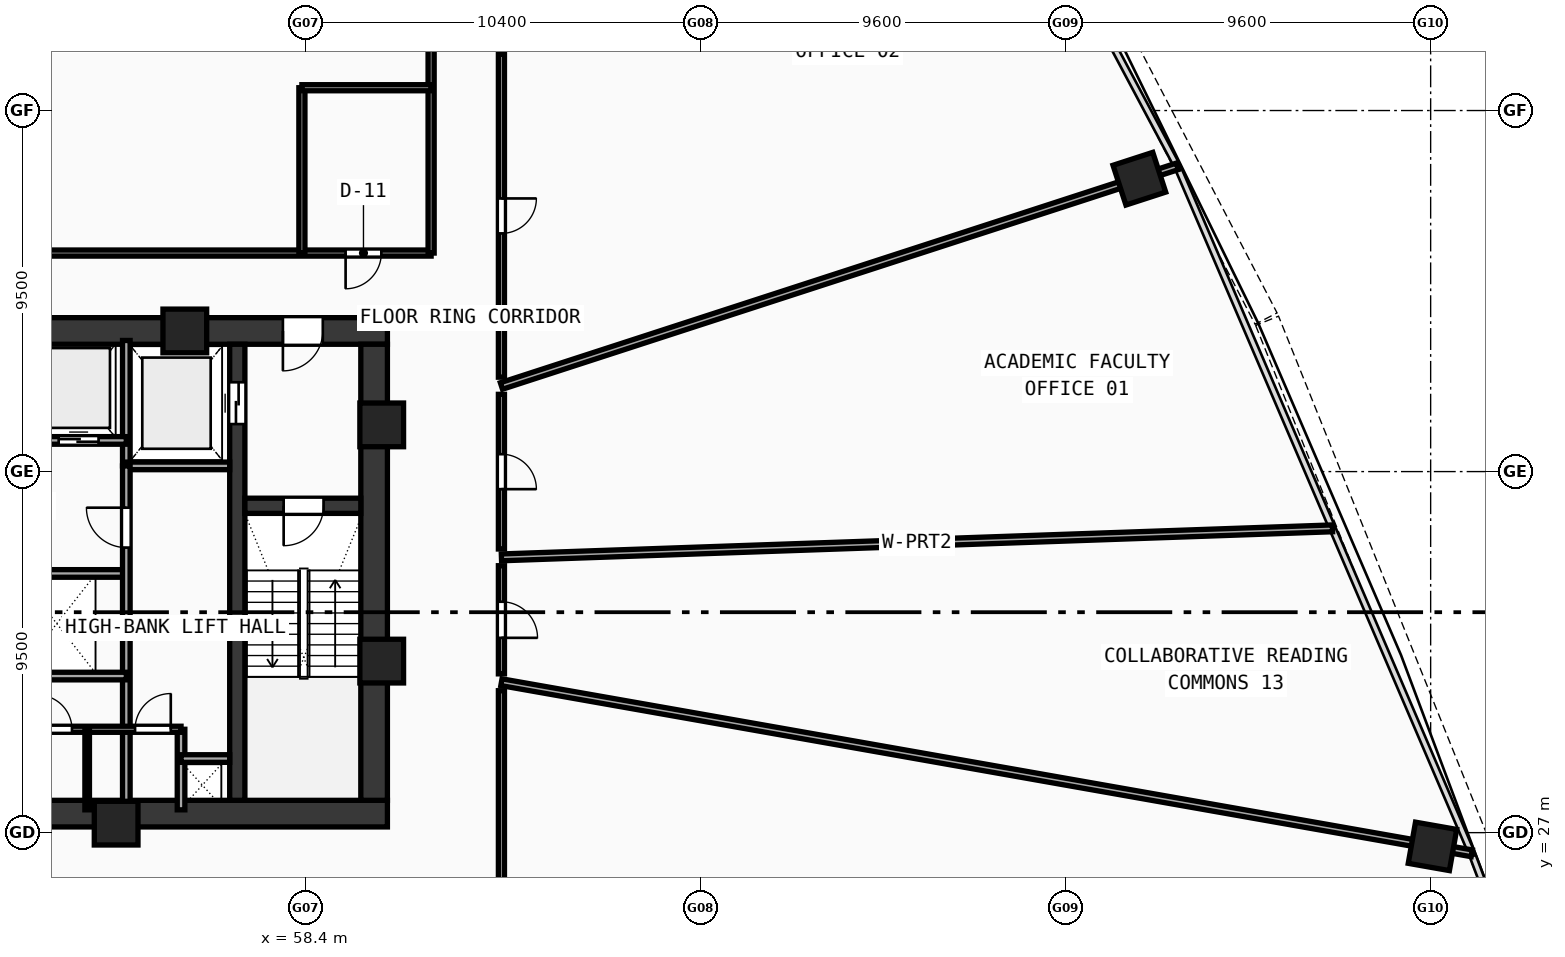
"""IFC4 building model, lengths in metres.
Left out: names, types, materials, properties, quantities, classifications, styles, units other than length and angle.
Written with IfcOpenShell. Run it as: python <this file> out.ifc"""

import sys

from ifc_helpers import new_model, si_unit, direction, frame, frame_2d, origin, origin_with_axes, origin_2d, place, context, subcontext, project, spatial, rectangle, hollow_rectangle, extrude, source, transform, mapped, element, fill, save


model = new_model("IFC4")
c1 = context("Model", 3, precision=1e-05, world=origin(), true_north=direction((0.0, 1.0)))
c2 = subcontext(c1, "Body", "Model", "MODEL_VIEW")
j1 = project(units=[si_unit("LENGTHUNIT", "METRE"), si_unit("PLANEANGLEUNIT", "RADIAN")], contexts=[c1])
p1 = place(None, origin())
s1 = spatial("IfcSite", under=j1, at=p1, CompositionType="ELEMENT")
p2 = place(p1, origin())
s2 = spatial("IfcBuilding", under=s1, at=p2, CompositionType="ELEMENT")
p3 = place(p2, frame((0.0, 0.0, 63.07)))
s3 = spatial("IfcBuildingStorey", under=s2, at=p3, CompositionType="ELEMENT", Elevation=63.07)
p4 = place(p3, frame((35.45, 27.5, 0.0), z_axis=(0.0, 0.0, 1.0), x_axis=(1.0, 0.0, 0.0)))
e1 = element("IfcWall", 1, at=p4, inside=s3, PredefinedType="SHEAR", context=c2, shape_type="SweptSolid", body=[
    extrude(rectangle(XDim=25.1, YDim=0.7, at=frame_2d((12.55, 0.0))), origin(), (0.0, 0.0, 1.0), 3.37),
])
p5 = place(p3, frame((49.2, 40.2, 0.0), z_axis=(0.0, 0.0, 1.0), x_axis=(1.0, 0.0, 0.0)))
e2 = element("IfcWall", 2, at=p5, inside=s3, PredefinedType="SHEAR", context=c2, shape_type="SweptSolid", body=[
    extrude(rectangle(XDim=11.35, YDim=0.7, at=frame_2d((5.675, 0.0))), origin(), (0.0, 0.0, 1.0), 3.37),
])
p6 = place(p5, frame((8.6, 0.0, 0.0)))
e3 = element("IfcOpeningElement", 3, at=p6, cuts=e2, PredefinedType="OPENING", context=c2, shape_type="SweptSolid", body=[
    extrude(rectangle(XDim=1.05, YDim=2.1, at=frame_2d((0.525, 1.05))), frame((0.0, 0.36, 0.0), z_axis=(0.0, -1.0, 0.0), x_axis=(1.0, 0.0, 0.0)), (0.0, 0.0, 1.0), 0.72),
])
p7 = place(p3, frame((60.2, 27.85, 0.0), z_axis=(0.0, 0.0, 1.0), x_axis=(0.0, 1.0, 0.0)))
e4 = element("IfcWall", 4, at=p7, inside=s3, PredefinedType="SHEAR", context=c2, shape_type="SweptSolid", body=[
    extrude(rectangle(XDim=12.0, YDim=0.7, at=frame_2d((6.0, 0.0))), origin(), (0.0, 0.0, 1.0), 3.37),
])
p8 = place(p3, frame((56.6, 27.85, 0.0), z_axis=(0.0, 0.0, 1.0), x_axis=(0.0, 1.0, 0.0)))
e5 = element("IfcWall", 5, at=p8, inside=s3, PredefinedType="SHEAR", context=c2, shape_type="SweptSolid", body=[
    extrude(rectangle(XDim=12.0, YDim=0.4, at=frame_2d((6.0, 0.0))), origin(), (0.0, 0.0, 1.0), 3.37),
])
p9 = place(p8, frame((9.9, 0.0, 0.0)))
e6 = element("IfcOpeningElement", 6, at=p9, cuts=e5, PredefinedType="OPENING", context=c2, shape_type="SweptSolid", body=[
    extrude(rectangle(XDim=1.1, YDim=2.1, at=frame_2d((0.55, 1.05))), frame((0.0, 0.21, 0.0), z_axis=(0.0, -1.0, 0.0), x_axis=(1.0, 0.0, 0.0)), (0.0, 0.0, 1.0), 0.42),
])
p10 = place(p3, frame((56.8, 35.6, 0.0), z_axis=(0.0, 0.0, 1.0), x_axis=(1.0, 0.0, 0.0)))
e7 = element("IfcWall", 7, at=p10, inside=s3, PredefinedType="SHEAR", context=c2, shape_type="SweptSolid", body=[
    extrude(rectangle(XDim=3.05, YDim=0.4, at=frame_2d((1.525, 0.0))), origin(), (0.0, 0.0, 1.0), 3.37),
])
p11 = place(p10, frame((1.02, 0.0, 0.0)))
e8 = element("IfcOpeningElement", 8, at=p11, cuts=e7, PredefinedType="OPENING", context=c2, shape_type="SweptSolid", body=[
    extrude(rectangle(XDim=1.05, YDim=2.1, at=frame_2d((0.525, 1.05))), frame((0.0, 0.21, 0.0), z_axis=(0.0, -1.0, 0.0), x_axis=(1.0, 0.0, 0.0)), (0.0, 0.0, 1.0), 0.42),
])
m1 = source(origin(), c2, "Body", "SweptSolid", [
    extrude(hollow_rectangle(XDim=1.15, YDim=1.15, WallThickness=0.048, at=origin_2d()), origin(), (0.0, 0.0, 1.0), 3.63),
])
for number, where, z_axis, x_axis in (
    (9, (53.412, 27.25, -0.26), (0.0, 0.0, 1.0), (1.0, 0.0, 0.0)),
    (10, (60.4, 31.513, -0.26), (0.0, 0.0, 1.0), (1.0, 0.0, 0.0)),
    (11, (60.4, 37.729, -0.26), (0.0, 0.0, 1.0), (1.0, 0.0, 0.0)),
    (12, (55.219, 40.2, -0.26), (0.0, 0.0, 1.0), (1.0, 0.0, 0.0)),
):
    element("IfcColumn", number, at=place(p3, frame(where, z_axis=z_axis, x_axis=x_axis)), inside=s3, PredefinedType="COLUMN", context=c2, shape_type="MappedRepresentation", body=[
        mapped(m1, transform((0.0, 0.0, 0.0), scale=1.0)),
    ])
m2 = source(origin(), c2, "Body", "SweptSolid", [
    extrude(hollow_rectangle(XDim=1.1, YDim=1.1, WallThickness=0.045, at=origin_2d()), origin(), (0.0, 0.0, 1.0), 3.63),
])
for number, where, z_axis, x_axis in (
    (13, (88.048, 26.638, -0.26), (0.0, 0.0, 1.0), (0.174, 0.985, 0.0)),
    (14, (80.335, 44.206, -0.26), (0.0, 0.0, 1.0), (-0.309, 0.951, 0.0)),
):
    element("IfcColumn", number, at=place(p3, frame(where, z_axis=z_axis, x_axis=x_axis)), inside=s3, PredefinedType="COLUMN", context=c2, shape_type="MappedRepresentation", body=[
        mapped(m2, transform((0.0, 0.0, 0.0), scale=1.0)),
    ])
p12 = place(p3, frame((53.68, 36.65, 0.0), z_axis=(0.0, 0.0, 1.0), x_axis=(0.0, 1.0, 0.0)))
e15 = element("IfcWall", 15, at=p12, inside=s3, PredefinedType="SOLIDWALL", context=c2, shape_type="SweptSolid", body=[
    extrude(rectangle(XDim=3.3, YDim=0.2, at=frame_2d((1.65, 0.0))), origin(), (0.0, 0.0, 1.0), 3.37),
])
p13 = place(p3, frame((53.68, 36.65, 0.0), z_axis=(0.0, 0.0, 1.0), x_axis=(1.0, 0.0, 0.0)))
e16 = element("IfcWall", 16, at=p13, inside=s3, PredefinedType="SOLIDWALL", context=c2, shape_type="SweptSolid", body=[
    extrude(rectangle(XDim=2.72, YDim=0.2, at=frame_2d((1.36, 0.0))), origin(), (0.0, 0.0, 1.0), 3.37),
])
p14 = place(p3, frame((48.95, 37.32, 0.0), z_axis=(0.0, 0.0, 1.0), x_axis=(1.0, 0.0, 0.0)))
e17 = element("IfcWall", 17, at=p14, inside=s3, PredefinedType="SOLIDWALL", context=c2, shape_type="SweptSolid", body=[
    extrude(rectangle(XDim=4.73, YDim=0.2, at=frame_2d((2.365, 0.0))), origin(), (0.0, 0.0, 1.0), 3.37),
])
p15 = place(p14, frame((0.65, 0.0, 0.0)))
e18 = element("IfcOpeningElement", 18, at=p15, cuts=e17, PredefinedType="OPENING", context=c2, shape_type="SweptSolid", body=[
    extrude(rectangle(XDim=1.05, YDim=2.1, at=frame_2d((0.525, 1.05))), frame((0.0, 0.11, 0.0), z_axis=(0.0, -1.0, 0.0), x_axis=(1.0, 0.0, 0.0)), (0.0, 0.0, 1.0), 0.22),
])
p16 = place(p14, frame((2.95, 0.0, 0.0)))
e19 = element("IfcOpeningElement", 19, at=p16, cuts=e17, PredefinedType="OPENING", context=c2, shape_type="SweptSolid", body=[
    extrude(rectangle(XDim=1.05, YDim=2.1, at=frame_2d((0.525, 1.05))), frame((0.0, 0.11, 0.0), z_axis=(0.0, -1.0, 0.0), x_axis=(1.0, 0.0, 0.0)), (0.0, 0.0, 1.0), 0.22),
])
p17 = place(p3, frame((43.85, 33.82, 0.0), z_axis=(0.0, 0.0, 1.0), x_axis=(1.0, 0.0, 0.0)))
e20 = element("IfcWall", 20, at=p17, inside=s3, PredefinedType="SOLIDWALL", context=c2, shape_type="SweptSolid", body=[
    extrude(rectangle(XDim=9.83, YDim=0.2, at=frame_2d((4.915, 0.0))), origin(), (0.0, 0.0, 1.0), 3.37),
])
p18 = place(p3, frame((53.68, 27.6, 0.0), z_axis=(0.0, 0.0, 1.0), x_axis=(0.0, 1.0, 0.0)))
e21 = element("IfcWall", 21, at=p18, inside=s3, PredefinedType="SOLIDWALL", context=c2, shape_type="SweptSolid", body=[
    extrude(rectangle(XDim=9.05, YDim=0.2, at=frame_2d((4.525, 0.0))), origin(), (0.0, 0.0, 1.0), 3.37),
])
p19 = place(p18, frame((6.9, 0.0, 0.0)))
e22 = element("IfcOpeningElement", 22, at=p19, cuts=e21, PredefinedType="OPENING", context=c2, shape_type="SweptSolid", body=[
    extrude(rectangle(XDim=1.05, YDim=2.1, at=frame_2d((0.525, 1.05))), frame((0.0, 0.11, 0.0), z_axis=(0.0, -1.0, 0.0), x_axis=(1.0, 0.0, 0.0)), (0.0, 0.0, 1.0), 0.22),
])
p20 = place(p3, frame((43.85, 31.12, 0.0), z_axis=(0.0, 0.0, 1.0), x_axis=(1.0, 0.0, 0.0)))
e23 = element("IfcWall", 23, at=p20, inside=s3, PredefinedType="SOLIDWALL", context=c2, shape_type="SweptSolid", body=[
    extrude(rectangle(XDim=9.83, YDim=0.2, at=frame_2d((4.915, 0.0))), origin(), (0.0, 0.0, 1.0), 3.37),
])
p21 = place(p3, frame((55.12, 27.6, 0.0), z_axis=(0.0, 0.0, 1.0), x_axis=(0.0, 1.0, 0.0)))
e24 = element("IfcWall", 24, at=p21, inside=s3, PredefinedType="SOLIDWALL", context=c2, shape_type="SweptSolid", body=[
    extrude(rectangle(XDim=2.12, YDim=0.2, at=frame_2d((1.06, 0.0))), origin(), (0.0, 0.0, 1.0), 3.37),
])
p22 = place(p3, frame((55.12, 28.95, 0.0), z_axis=(0.0, 0.0, 1.0), x_axis=(1.0, 0.0, 0.0)))
e25 = element("IfcWall", 25, at=p22, inside=s3, PredefinedType="SOLIDWALL", context=c2, shape_type="SweptSolid", body=[
    extrude(rectangle(XDim=1.28, YDim=0.2, at=frame_2d((0.64, 0.0))), origin(), (0.0, 0.0, 1.0), 3.37),
])
p23 = place(p3, frame((51.05, 29.72, 0.0), z_axis=(0.0, 0.0, 1.0), x_axis=(1.0, 0.0, 0.0)))
e26 = element("IfcWall", 26, at=p23, inside=s3, PredefinedType="PARTITIONING", context=c2, shape_type="SweptSolid", body=[
    extrude(rectangle(XDim=4.07, YDim=0.16, at=frame_2d((2.035, 0.0))), origin(), (0.0, 0.0, 1.0), 3.37),
])
p24 = place(p23, frame((0.3, 0.0, 0.0)))
e27 = element("IfcOpeningElement", 27, at=p24, cuts=e26, PredefinedType="OPENING", context=c2, shape_type="SweptSolid", body=[
    extrude(rectangle(XDim=0.9, YDim=2.1, at=frame_2d((0.45, 1.05))), frame((0.0, 0.09, 0.0), z_axis=(0.0, -1.0, 0.0), x_axis=(1.0, 0.0, 0.0)), (0.0, 0.0, 1.0), 0.18),
])
p25 = place(p23, frame((2.86, 0.0, 0.0)))
e28 = element("IfcOpeningElement", 28, at=p25, cuts=e26, PredefinedType="OPENING", context=c2, shape_type="SweptSolid", body=[
    extrude(rectangle(XDim=0.94, YDim=2.1, at=frame_2d((0.47, 1.05))), frame((0.0, 0.09, 0.0), z_axis=(0.0, -1.0, 0.0), x_axis=(1.0, 0.0, 0.0)), (0.0, 0.0, 1.0), 0.18),
])
p26 = place(p3, frame((52.65, 27.6, 0.0), z_axis=(0.0, 0.0, 1.0), x_axis=(0.0, 1.0, 0.0)))
e29 = element("IfcWall", 29, at=p26, inside=s3, PredefinedType="PARTITIONING", context=c2, shape_type="SweptSolid", body=[
    extrude(rectangle(XDim=2.12, YDim=0.12, at=frame_2d((1.06, 0.0))), origin(), (0.0, 0.0, 1.0), 3.37),
])
p27 = place(p3, frame((45.92, 42.25, 0.0), z_axis=(0.0, 0.0, 1.0), x_axis=(1.0, 0.0, 0.0)))
e30 = element("IfcWall", 30, at=p27, inside=s3, PredefinedType="PARTITIONING", context=c2, shape_type="SweptSolid", body=[
    extrude(rectangle(XDim=15.78, YDim=0.16, at=frame_2d((7.89, 0.0))), origin(), (0.0, 0.0, 1.0), 2.67),
])
p28 = place(p27, frame((2.1, 0.0, 0.0)))
e31 = element("IfcOpeningElement", 31, at=p28, cuts=e30, PredefinedType="OPENING", context=c2, shape_type="SweptSolid", body=[
    extrude(rectangle(XDim=0.92, YDim=2.1, at=frame_2d((0.46, 1.05))), frame((0.0, 0.09, 0.0), z_axis=(0.0, -1.0, 0.0), x_axis=(1.0, 0.0, 0.0)), (0.0, 0.0, 1.0), 0.18),
])
p29 = place(p27, frame((13.53, 0.0, 0.0)))
e32 = element("IfcOpeningElement", 32, at=p29, cuts=e30, PredefinedType="OPENING", context=c2, shape_type="SweptSolid", body=[
    extrude(rectangle(XDim=0.94, YDim=2.1, at=frame_2d((0.47, 1.05))), frame((0.0, 0.09, 0.0), z_axis=(0.0, -1.0, 0.0), x_axis=(1.0, 0.0, 0.0)), (0.0, 0.0, 1.0), 0.18),
])
p30 = place(p3, frame((61.7, 42.25, 0.0), z_axis=(0.0, 0.0, 1.0), x_axis=(0.0, 1.0, 0.0)))
e33 = element("IfcWall", 33, at=p30, inside=s3, PredefinedType="PARTITIONING", context=c2, shape_type="SweptSolid", body=[
    extrude(rectangle(XDim=11.7, YDim=0.16, at=frame_2d((5.85, 0.0))), origin(), (0.0, 0.0, 1.0), 2.67),
])
p31 = place(p3, frame((58.3, 42.25, 0.0), z_axis=(0.0, 0.0, 1.0), x_axis=(0.0, 1.0, 0.0)))
e34 = element("IfcWall", 34, at=p31, inside=s3, PredefinedType="PARTITIONING", context=c2, shape_type="SweptSolid", body=[
    extrude(rectangle(XDim=4.35, YDim=0.16, at=frame_2d((2.175, 0.0))), origin(), (0.0, 0.0, 1.0), 2.67),
])
p32 = place(p3, frame((58.3, 46.6, 0.0), z_axis=(0.0, 0.0, 1.0), x_axis=(1.0, 0.0, 0.0)))
e35 = element("IfcWall", 35, at=p32, inside=s3, PredefinedType="PARTITIONING", context=c2, shape_type="SweptSolid", body=[
    extrude(rectangle(XDim=3.4, YDim=0.16, at=frame_2d((1.7, 0.0))), origin(), (0.0, 0.0, 1.0), 2.97),
])
p33 = place(p3, frame((63.55, 34.243, 0.0), z_axis=(0.0, 0.0, 1.0), x_axis=(0.999390701976, 0.034903077271, 0.0)))
e36 = element("IfcWall", 36, at=p33, inside=s3, PredefinedType="PARTITIONING", context=c2, shape_type="SweptSolid", body=[
    extrude(rectangle(XDim=21.88, YDim=0.18, at=frame_2d((10.94, 0.0))), origin(), (0.0, 0.0, 1.0), 2.67),
])
p34 = place(p3, frame((63.55, 38.752, 0.0), z_axis=(0.0, 0.0, 1.0), x_axis=(0.951053160417, 0.309027322514, 0.0)))
e37 = element("IfcWall", 37, at=p34, inside=s3, PredefinedType="PARTITIONING", context=c2, shape_type="SweptSolid", body=[
    extrude(rectangle(XDim=18.699, YDim=0.18, at=frame_2d((9.35, 0.0))), origin(), (0.0, 0.0, 1.0), 2.67),
])
p35 = place(p3, frame((63.55, 30.958, 0.0), z_axis=(0.0, 0.0, 1.0), x_axis=(0.984809239356, -0.173639747982, 0.0)))
e38 = element("IfcWall", 38, at=p35, inside=s3, PredefinedType="PARTITIONING", context=c2, shape_type="SweptSolid", body=[
    extrude(rectangle(XDim=25.926, YDim=0.18, at=frame_2d((12.963, 0.0))), origin(), (0.0, 0.0, 1.0), 2.67),
])
p36 = place(p3, frame((63.55, 47.482, 0.0), z_axis=(0.0, 0.0, 1.0), x_axis=(0.0, -1.0, 0.0)))
e39 = element("IfcWall", 39, at=p36, inside=s3, PredefinedType="PARTITIONING", context=c2, shape_type="SweptSolid", body=[
    extrude(rectangle(XDim=8.498, YDim=0.16, at=frame_2d((4.249, 0.0))), origin(), (0.0, 0.0, 1.0), 2.67),
])
p37 = place(p36, frame((3.795, 0.0, 0.0)))
e40 = element("IfcOpeningElement", 40, at=p37, cuts=e39, PredefinedType="OPENING", context=c2, shape_type="SweptSolid", body=[
    extrude(rectangle(XDim=0.92, YDim=2.1, at=frame_2d((0.46, 1.05))), frame((0.0, 0.09, 0.0), z_axis=(0.0, -1.0, 0.0), x_axis=(1.0, 0.0, 0.0)), (0.0, 0.0, 1.0), 0.18),
])
p38 = place(p3, frame((63.55, 38.533, 0.0), z_axis=(0.0, 0.0, 1.0), x_axis=(0.0, -1.0, 0.0)))
e41 = element("IfcWall", 41, at=p38, inside=s3, PredefinedType="PARTITIONING", context=c2, shape_type="SweptSolid", body=[
    extrude(rectangle(XDim=4.07, YDim=0.16, at=frame_2d((2.035, 0.0))), origin(), (0.0, 0.0, 1.0), 3.37),
])
p39 = place(p38, frame((1.575, 0.0, 0.0)))
e42 = element("IfcOpeningElement", 42, at=p39, cuts=e41, PredefinedType="OPENING", context=c2, shape_type="SweptSolid", body=[
    extrude(rectangle(XDim=0.92, YDim=2.1, at=frame_2d((0.46, 1.05))), frame((0.0, 0.09, 0.0), z_axis=(0.0, -1.0, 0.0), x_axis=(1.0, 0.0, 0.0)), (0.0, 0.0, 1.0), 0.18),
])
p40 = place(p3, frame((63.55, 34.023, 0.0), z_axis=(0.0, 0.0, 1.0), x_axis=(0.0, -1.0, 0.0)))
e43 = element("IfcWall", 43, at=p40, inside=s3, PredefinedType="PARTITIONING", context=c2, shape_type="SweptSolid", body=[
    extrude(rectangle(XDim=2.845, YDim=0.16, at=frame_2d((1.423, 0.0))), origin(), (0.0, 0.0, 1.0), 3.37),
])
p41 = place(p40, frame((0.948, 0.0, 0.0)))
e44 = element("IfcOpeningElement", 44, at=p41, cuts=e43, PredefinedType="OPENING", context=c2, shape_type="SweptSolid", body=[
    extrude(rectangle(XDim=0.95, YDim=2.1, at=frame_2d((0.475, 1.05))), frame((0.0, 0.09, 0.0), z_axis=(0.0, -1.0, 0.0), x_axis=(1.0, 0.0, 0.0)), (0.0, 0.0, 1.0), 0.18),
])
p42 = place(p3, frame((63.55, 30.735, 0.0), z_axis=(0.0, 0.0, 1.0), x_axis=(0.0, -1.0, 0.0)))
e45 = element("IfcWall", 45, at=p42, inside=s3, PredefinedType="PARTITIONING", context=c2, shape_type="SweptSolid", body=[
    extrude(rectangle(XDim=5.935, YDim=0.16, at=frame_2d((2.967, 0.0))), origin(), (0.0, 0.0, 1.0), 2.97),
])
m3 = source(origin(), c2, "Body", "SweptSolid", [
    extrude(rectangle(XDim=1.05, YDim=2.1, at=frame_2d((0.525, 1.05))), frame((0.0, 0.025, 0.0), z_axis=(0.0, -1.0, 0.0), x_axis=(1.0, 0.0, 0.0)), (0.0, 0.0, 1.0), 0.05),
])
p43 = place(p11, frame((1.05, 0.0, 0.0), z_axis=(0.0, 0.0, 1.0), x_axis=(-1.0, 0.0, 0.0)))
e46 = element("IfcDoor", 46, at=p43, inside=s3, OperationType="SINGLE_SWING_RIGHT", PredefinedType="DOOR", context=c2, shape_type="MappedRepresentation", body=[
    mapped(m3, transform((0.0, 0.0, 0.0), scale=1.0)),
])
fill(e8, e46)
p44 = place(p6, frame((1.05, 0.0, 0.0), z_axis=(0.0, 0.0, 1.0), x_axis=(-1.0, 0.0, 0.0)))
e47 = element("IfcDoor", 47, at=p44, inside=s3, OperationType="SINGLE_SWING_RIGHT", PredefinedType="DOOR", context=c2, shape_type="MappedRepresentation", body=[
    mapped(m3, transform((0.0, 0.0, 0.0), scale=1.0)),
])
fill(e3, e47)
m4 = source(origin(), c2, "Body", "SweptSolid", [
    extrude(rectangle(XDim=1.1, YDim=2.1, at=frame_2d((0.55, 1.05))), frame((0.0, 0.025, 0.0), z_axis=(0.0, -1.0, 0.0), x_axis=(1.0, 0.0, 0.0)), (0.0, 0.0, 1.0), 0.05),
])
p45 = place(p9, origin_with_axes())
e48 = element("IfcDoor", 48, at=p45, inside=s3, OperationType="DOUBLE_DOOR_SLIDING", PredefinedType="DOOR", context=c2, shape_type="MappedRepresentation", body=[
    mapped(m4, transform((0.0, 0.0, 0.0), scale=1.0)),
])
fill(e6, e48)
p46 = place(p16, frame((1.05, 0.0, 0.0), z_axis=(0.0, 0.0, 1.0), x_axis=(-1.0, 0.0, 0.0)))
e49 = element("IfcDoor", 49, at=p46, inside=s3, OperationType="DOUBLE_DOOR_SLIDING", PredefinedType="DOOR", context=c2, shape_type="MappedRepresentation", body=[
    mapped(m3, transform((0.0, 0.0, 0.0), scale=1.0)),
])
fill(e19, e49)
p47 = place(p19, origin_with_axes())
e50 = element("IfcDoor", 50, at=p47, inside=s3, OperationType="SINGLE_SWING_RIGHT", PredefinedType="DOOR", context=c2, shape_type="MappedRepresentation", body=[
    mapped(m3, transform((0.0, 0.0, 0.0), scale=1.0)),
])
fill(e22, e50)
m5 = source(origin(), c2, "Body", "SweptSolid", [
    extrude(rectangle(XDim=0.9, YDim=2.1, at=frame_2d((0.45, 1.05))), frame((0.0, 0.025, 0.0), z_axis=(0.0, -1.0, 0.0), x_axis=(1.0, 0.0, 0.0)), (0.0, 0.0, 1.0), 0.05),
])
p48 = place(p24, origin_with_axes())
e51 = element("IfcDoor", 51, at=p48, inside=s3, OperationType="SINGLE_SWING_LEFT", PredefinedType="DOOR", context=c2, shape_type="MappedRepresentation", body=[
    mapped(m5, transform((0.0, 0.0, 0.0), scale=1.0)),
])
fill(e27, e51)
m6 = source(origin(), c2, "Body", "SweptSolid", [
    extrude(rectangle(XDim=0.94, YDim=2.1, at=frame_2d((0.47, 1.05))), frame((0.0, 0.025, 0.0), z_axis=(0.0, -1.0, 0.0), x_axis=(1.0, 0.0, 0.0)), (0.0, 0.0, 1.0), 0.05),
])
p49 = place(p25, origin_with_axes())
e52 = element("IfcDoor", 52, at=p49, inside=s3, OperationType="SINGLE_SWING_RIGHT", PredefinedType="DOOR", context=c2, shape_type="MappedRepresentation", body=[
    mapped(m6, transform((0.0, 0.0, 0.0), scale=1.0)),
])
fill(e28, e52)
p50 = place(p29, frame((0.94, 0.0, 0.0), z_axis=(0.0, 0.0, 1.0), x_axis=(-1.0, 0.0, 0.0)))
e53 = element("IfcDoor", 53, at=p50, inside=s3, OperationType="SINGLE_SWING_RIGHT", PredefinedType="DOOR", context=c2, shape_type="MappedRepresentation", body=[
    mapped(m6, transform((0.0, 0.0, 0.0), scale=1.0)),
])
fill(e32, e53)
m7 = source(origin(), c2, "Body", "SweptSolid", [
    extrude(rectangle(XDim=0.92, YDim=2.1, at=frame_2d((0.46, 1.05))), frame((0.0, 0.025, 0.0), z_axis=(0.0, -1.0, 0.0), x_axis=(1.0, 0.0, 0.0)), (0.0, 0.0, 1.0), 0.05),
])
p51 = place(p39, origin_with_axes())
e54 = element("IfcDoor", 54, at=p51, inside=s3, OperationType="SINGLE_SWING_RIGHT", PredefinedType="DOOR", context=c2, shape_type="MappedRepresentation", body=[
    mapped(m7, transform((0.0, 0.0, 0.0), scale=1.0)),
])
fill(e42, e54)
p52 = place(p37, origin_with_axes())
e55 = element("IfcDoor", 55, at=p52, inside=s3, OperationType="SINGLE_SWING_LEFT", PredefinedType="DOOR", context=c2, shape_type="MappedRepresentation", body=[
    mapped(m7, transform((0.0, 0.0, 0.0), scale=1.0)),
])
fill(e40, e55)
m8 = source(origin(), c2, "Body", "SweptSolid", [
    extrude(rectangle(XDim=0.95, YDim=2.1, at=frame_2d((0.475, 1.05))), frame((0.0, 0.025, 0.0), z_axis=(0.0, -1.0, 0.0), x_axis=(1.0, 0.0, 0.0)), (0.0, 0.0, 1.0), 0.05),
])
p53 = place(p41, origin_with_axes())
e56 = element("IfcDoor", 56, at=p53, inside=s3, OperationType="SINGLE_SWING_RIGHT", PredefinedType="DOOR", context=c2, shape_type="MappedRepresentation", body=[
    mapped(m8, transform((0.0, 0.0, 0.0), scale=1.0)),
])
fill(e44, e56)
save(model, sys.argv[1])
